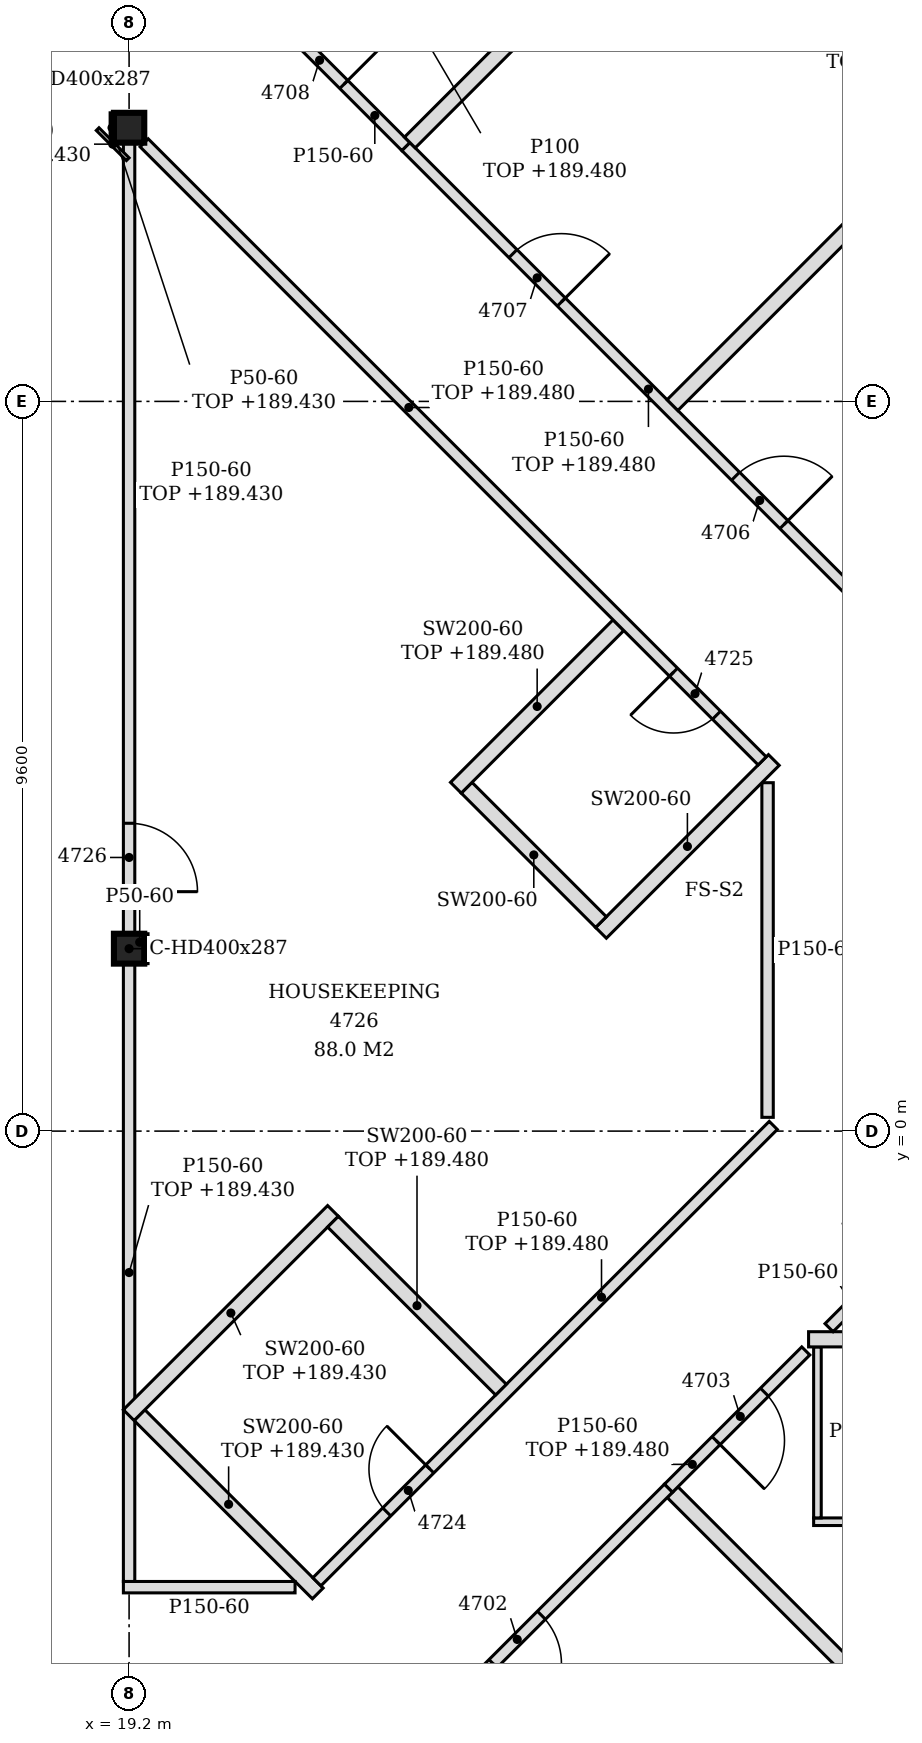
"""IFC4 building model, lengths in metres.
Left out: names, types, materials, properties, quantities, classifications, styles, units other than length and angle.
Written with IfcOpenShell. Run it as: python <this file> out.ifc"""

import sys

from ifc_helpers import new_model, si_unit, direction, frame, frame_2d, origin, origin_2d, place, context, subcontext, project, spatial, polyline, rectangle, i_section, outline, extrude, element, fill, save


model = new_model("IFC4")
c1 = context("Model", 3, precision=1e-05, world=origin(), true_north=direction((0.0, 1.0)))
c2 = subcontext(c1, "Body", "Model", "MODEL_VIEW")
j1 = project(units=[si_unit("LENGTHUNIT", "METRE"), si_unit("PLANEANGLEUNIT", "RADIAN")], contexts=[c1])
p1 = place(None, origin())
s1 = spatial("IfcSite", under=j1, at=p1, CompositionType="ELEMENT")
p2 = place(p1, origin())
s2 = spatial("IfcBuilding", under=s1, at=p2, CompositionType="ELEMENT")
p3 = place(p2, frame((0.0, 0.0, 186.6)))
s3 = spatial("IfcBuildingStorey", under=s2, at=p3, CompositionType="ELEMENT", Elevation=186.6)
for number, where, z_axis, x_axis in (
    (1, (19.2, 2.4, -0.15), (0.0, 0.0, 1.0), (1.0, 0.0, 0.0)),
    (2, (19.2, 13.2, -0.15), (0.0, 0.0, 1.0), (1.0, 0.0, 0.0)),
):
    element("IfcColumn", number, at=place(p3, frame(where, z_axis=z_axis, x_axis=x_axis)), inside=s3, PredefinedType="COLUMN", context=c2, shape_type="SweptSolid", body=[
        extrude(i_section(OverallWidth=0.399, OverallDepth=0.393, WebThickness=0.023, FlangeThickness=0.037, FilletRadius=0.015, at=origin_2d()), origin(), (0.0, 0.0, 1.0), 3.6),
    ])
p4 = place(p3, frame((33.981, -12.381, 0.0), z_axis=(0.0, 0.0, 1.0), x_axis=(-0.707095469378, 0.707118092814, 0.0)))
e3 = element("IfcWall", 3, at=p4, inside=s3, PredefinedType="PARTITIONING", context=c2, shape_type="SweptSolid", body=[
    extrude(rectangle(XDim=10.792, YDim=0.2, at=frame_2d((5.396, 0.0))), origin(), (0.0, 0.0, 1.0), 2.63),
])
p5 = place(p3, frame((20.322, -10.672, 0.0), z_axis=(0.0, 0.0, 1.0), x_axis=(0.707106781187, 0.707106781187, 0.0)))
e4 = element("IfcWall", 4, at=p5, inside=s3, PredefinedType="PARTITIONING", context=c2, shape_type="SweptSolid", body=[
    extrude(rectangle(XDim=8.45, YDim=0.15, at=frame_2d((4.225, 0.0))), origin(), (0.0, 0.0, 1.0), 2.88),
])
p6 = place(p5, frame((0.869, 0.0, 0.0)))
e5 = element("IfcOpeningElement", 5, at=p6, cuts=e4, PredefinedType="OPENING", context=c2, shape_type="SweptSolid", body=[
    extrude(rectangle(XDim=0.9, YDim=2.1, at=frame_2d((0.45, 1.05))), frame((0.0, 0.085, 0.0), z_axis=(0.0, -1.0, 0.0), x_axis=(1.0, 0.0, 0.0)), (0.0, 0.0, 1.0), 0.17),
])
p7 = place(p5, frame((5.185, 0.0, 0.0)))
e6 = element("IfcOpeningElement", 6, at=p7, cuts=e4, PredefinedType="OPENING", context=c2, shape_type="SweptSolid", body=[
    extrude(rectangle(XDim=0.9, YDim=2.1, at=frame_2d((0.45, 1.05))), frame((0.0, 0.085, 0.0), z_axis=(0.0, -1.0, 0.0), x_axis=(1.0, 0.0, 0.0)), (0.0, 0.0, 1.0), 0.17),
])
p8 = place(p3, frame((21.682, -6.082, 0.0), z_axis=(0.0, 0.0, 1.0), x_axis=(-0.707143579957, 0.707069980501, 0.0)))
e7 = element("IfcWall", 7, at=p8, inside=s3, PredefinedType="PARTITIONING", context=c2, shape_type="SweptSolid", body=[
    extrude(rectangle(XDim=3.317, YDim=0.2, at=frame_2d((1.659, 0.0))), origin(), (0.0, 0.0, 1.0), 2.83),
])
p9 = place(p3, frame((19.125, -6.0, 0.0), z_axis=(0.0, 0.0, 1.0), x_axis=(1.0, 0.0, 0.0)))
e8 = element("IfcWall", 8, at=p9, inside=s3, PredefinedType="PARTITIONING", context=c2, shape_type="SweptSolid", body=[
    extrude(outline(polyline([(0.0, 0.0), (2.259, 0.0), (2.259, 3.45), (0.225, 3.45), (0.223, 2.83), (0.0, 2.83), (0.0, 0.0)])), frame((0.0, 0.075, 0.0), z_axis=(0.0, -1.0, 0.0), x_axis=(1.0, 0.0, 0.0)), (0.0, 0.0, 1.0), 0.15),
])
p10 = place(p3, frame((19.2, -5.925, 0.0), z_axis=(0.0, 0.0, 1.0), x_axis=(0.0, 1.0, 0.0)))
e9 = element("IfcWall", 9, at=p10, inside=s3, PredefinedType="PARTITIONING", context=c2, shape_type="SweptSolid", body=[
    extrude(rectangle(XDim=8.129, YDim=0.15, at=frame_2d((4.064, 0.0))), origin(), (0.0, 0.0, 1.0), 2.83),
])
p11 = place(p3, frame((21.671, -5.929, 0.0), z_axis=(0.0, 0.0, 1.0), x_axis=(0.707121156928, 0.707092405153, 0.0)))
e10 = element("IfcWall", 10, at=p11, inside=s3, PredefinedType="PARTITIONING", context=c2, shape_type="SweptSolid", body=[
    extrude(rectangle(XDim=8.491, YDim=0.15, at=frame_2d((4.246, 0.0))), origin(), (0.0, 0.0, 1.0), 2.88),
])
p12 = place(p11, frame((1.3, 0.0, 0.0)))
e11 = element("IfcOpeningElement", 11, at=p12, cuts=e10, PredefinedType="OPENING", context=c2, shape_type="SweptSolid", body=[
    extrude(rectangle(XDim=0.8, YDim=2.1, at=frame_2d((0.4, 1.05))), frame((0.0, 0.085, 0.0), z_axis=(0.0, -1.0, 0.0), x_axis=(1.0, 0.0, 0.0)), (0.0, 0.0, 1.0), 0.17),
])
p13 = place(p3, frame((28.206, -5.139, 0.0), z_axis=(0.0, 0.0, 1.0), x_axis=(1.0, 0.0, 0.0)))
e12 = element("IfcWall", 12, at=p13, inside=s3, PredefinedType="PARTITIONING", context=c2, shape_type="SweptSolid", body=[
    extrude(rectangle(XDim=2.5, YDim=0.1, at=frame_2d((1.25, 0.0))), origin(), (0.0, 0.0, 1.0), 3.45),
])
p14 = place(p3, frame((28.256, -5.089, 0.0), z_axis=(0.0, 0.0, 1.0), x_axis=(0.0, 1.0, 0.0)))
e13 = element("IfcWall", 13, at=p14, inside=s3, PredefinedType="PARTITIONING", context=c2, shape_type="SweptSolid", body=[
    extrude(outline(polyline([(0.0, 0.0), (2.25, 0.0), (2.25, 3.45), (1.744, 3.45), (1.742, 2.88), (1.534, 2.88), (1.532, 3.45), (0.0, 3.45), (0.0, 0.0)])), frame((0.0, 0.05, 0.0), z_axis=(0.0, -1.0, 0.0), x_axis=(1.0, 0.0, 0.0)), (0.0, 0.0, 1.0), 0.1),
])
p15 = place(p3, frame((26.297, -4.697, 0.0), z_axis=(0.0, 0.0, 1.0), x_axis=(0.707250205701, 0.706963327575, 0.0)))
e14 = element("IfcWall", 14, at=p15, inside=s3, PredefinedType="PARTITIONING", context=c2, shape_type="SweptSolid", body=[
    extrude(rectangle(XDim=2.553, YDim=0.15, at=frame_2d((1.276, 0.0))), origin(), (0.0, 0.0, 1.0), 2.88),
])
p16 = place(p15, frame((0.885, 0.0, 0.0)))
e15 = element("IfcOpeningElement", 15, at=p16, cuts=e14, PredefinedType="OPENING", context=c2, shape_type="SweptSolid", body=[
    extrude(rectangle(XDim=0.9, YDim=2.1, at=frame_2d((0.45, 1.05))), frame((0.0, 0.085, 0.0), z_axis=(0.0, -1.0, 0.0), x_axis=(1.0, 0.0, 0.0)), (0.0, 0.0, 1.0), 0.17),
])
p17 = place(p3, frame((19.195, -3.737, 0.0), z_axis=(0.0, 0.0, 1.0), x_axis=(0.707235264291, 0.706978274732, 0.0)))
e16 = element("IfcWall", 16, at=p17, inside=s3, PredefinedType="PARTITIONING", context=c2, shape_type="SweptSolid", body=[
    extrude(rectangle(XDim=3.8, YDim=0.2, at=frame_2d((1.9, 0.0))), origin(), (0.0, 0.0, 1.0), 2.83),
])
p18 = place(p3, frame((24.093, -3.401, 0.0), z_axis=(0.0, 0.0, 1.0), x_axis=(-0.707263013346, 0.7069505145, 0.0)))
e17 = element("IfcWall", 17, at=p18, inside=s3, PredefinedType="PARTITIONING", context=c2, shape_type="SweptSolid", body=[
    extrude(rectangle(XDim=3.125, YDim=0.2, at=frame_2d((1.562, 0.0))), origin(), (0.0, 0.0, 1.0), 2.88),
])
p19 = place(p3, frame((28.139, -2.739, 0.0), z_axis=(0.0, 0.0, 1.0), x_axis=(1.0, 0.0, 0.0)))
e18 = element("IfcWall", 18, at=p19, inside=s3, PredefinedType="PARTITIONING", context=c2, shape_type="SweptSolid", body=[
    extrude(outline(polyline([(0.0, 0.0), (11.081, 0.0), (11.081, 3.45), (3.21, 3.45), (3.208, 2.63), (2.91, 2.63), (2.908, 3.45), (0.0, 3.45), (0.0, 0.0)])), frame((0.0, 0.1, 0.0), z_axis=(0.0, -1.0, 0.0), x_axis=(1.0, 0.0, 0.0)), (0.0, 0.0, 1.0), 0.2),
])
p20 = place(p3, frame((28.409, -2.586, 0.0), z_axis=(0.0, 0.0, 1.0), x_axis=(0.706899570422, 0.707313931248, 0.0)))
e19 = element("IfcWall", 19, at=p20, inside=s3, PredefinedType="PARTITIONING", context=c2, shape_type="SweptSolid", body=[
    extrude(rectangle(XDim=2.357, YDim=0.15, at=frame_2d((1.178, 0.0))), origin(), (0.0, 0.0, 1.0), 3.45),
])
p21 = place(p20, frame((0.867, 0.0, 0.0)))
e20 = element("IfcOpeningElement", 20, at=p21, cuts=e19, PredefinedType="OPENING", context=c2, shape_type="SweptSolid", body=[
    extrude(rectangle(XDim=0.9, YDim=2.1, at=frame_2d((0.45, 1.05))), frame((0.0, 0.085, 0.0), z_axis=(0.0, -1.0, 0.0), x_axis=(1.0, 0.0, 0.0)), (0.0, 0.0, 1.0), 0.17),
])
p22 = place(p3, frame((27.6, 0.181, 0.0), z_axis=(0.0, 0.0, 1.0), x_axis=(0.0, 1.0, 0.0)))
e21 = element("IfcWall", 21, at=p22, inside=s3, PredefinedType="PARTITIONING", context=c2, shape_type="SweptSolid", body=[
    extrude(outline(polyline([(0.0, 0.0), (4.402, 0.0), (4.403, 3.45), (1.274, 3.45), (1.272, 2.88), (1.064, 2.88), (1.062, 3.45), (0.0, 3.45), (0.0, 0.0)])), frame((0.0, 0.075, 0.0), z_axis=(0.0, -1.0, 0.0), x_axis=(1.0, 0.0, 0.0)), (0.0, 0.0, 1.0), 0.15),
])
p23 = place(p3, frame((19.2, 2.596, 0.0), z_axis=(0.0, 0.0, 1.0), x_axis=(0.0, 1.0, 0.0)))
e22 = element("IfcWall", 22, at=p23, inside=s3, PredefinedType="PARTITIONING", context=c2, shape_type="SweptSolid", body=[
    extrude(rectangle(XDim=10.407, YDim=0.15, at=frame_2d((5.204, 0.0))), origin(), (0.0, 0.0, 1.0), 2.83),
])
p24 = place(p23, frame((0.553, 0.0, 0.0)))
e23 = element("IfcOpeningElement", 23, at=p24, cuts=e22, PredefinedType="OPENING", context=c2, shape_type="SweptSolid", body=[
    extrude(rectangle(XDim=0.9, YDim=2.1, at=frame_2d((0.45, 1.05))), frame((0.0, 0.085, 0.0), z_axis=(0.0, -1.0, 0.0), x_axis=(1.0, 0.0, 0.0)), (0.0, 0.0, 1.0), 0.17),
])
p25 = place(p3, frame((25.408, 2.608, 0.0), z_axis=(0.0, 0.0, 1.0), x_axis=(0.707144737481, 0.707068822855, 0.0)))
e24 = element("IfcWall", 24, at=p25, inside=s3, PredefinedType="PARTITIONING", context=c2, shape_type="SweptSolid", body=[
    extrude(rectangle(XDim=3.216, YDim=0.2, at=frame_2d((1.608, 0.0))), origin(), (0.0, 0.0, 1.0), 3.45),
])
p26 = place(p3, frame((25.408, 2.75, 0.0), z_axis=(0.0, 0.0, 1.0), x_axis=(-0.707106781187, 0.707106781187, 0.0)))
e25 = element("IfcWall", 25, at=p26, inside=s3, PredefinedType="PARTITIONING", context=c2, shape_type="SweptSolid", body=[
    extrude(rectangle(XDim=2.5, YDim=0.2, at=frame_2d((1.25, 0.0))), origin(), (0.0, 0.0, 1.0), 3.45),
])
p27 = place(p3, frame((23.499, 4.517, 0.0), z_axis=(0.0, 0.0, 1.0), x_axis=(0.707106781187, 0.707106781187, 0.0)))
e26 = element("IfcWall", 26, at=p27, inside=s3, PredefinedType="PARTITIONING", context=c2, shape_type="SweptSolid", body=[
    extrude(rectangle(XDim=3.025, YDim=0.2, at=frame_2d((1.512, 0.0))), origin(), (0.0, 0.0, 1.0), 2.88),
])
p28 = place(p3, frame((27.529, 4.871, 0.0), z_axis=(0.0, 0.0, 1.0), x_axis=(-0.707106781187, 0.707106781187, 0.0)))
e27 = element("IfcWall", 27, at=p28, inside=s3, PredefinedType="PARTITIONING", context=c2, shape_type="SweptSolid", body=[
    extrude(rectangle(XDim=11.5, YDim=0.15, at=frame_2d((5.75, 0.0))), origin(), (0.0, 0.0, 1.0), 2.88),
])
p29 = place(p28, frame((0.85, 0.0, 0.0)))
e28 = element("IfcOpeningElement", 28, at=p29, cuts=e27, PredefinedType="OPENING", context=c2, shape_type="SweptSolid", body=[
    extrude(rectangle(XDim=0.8, YDim=2.1, at=frame_2d((0.4, 1.05))), frame((0.0, 0.085, 0.0), z_axis=(0.0, -1.0, 0.0), x_axis=(1.0, 0.0, 0.0)), (0.0, 0.0, 1.0), 0.17),
])
p30 = place(p3, frame((29.872, 5.922, 0.0), z_axis=(0.0, 0.0, 1.0), x_axis=(-0.707119057879, 0.707094504281, 0.0)))
e29 = element("IfcWall", 29, at=p30, inside=s3, PredefinedType="PARTITIONING", context=c2, shape_type="SweptSolid", body=[
    extrude(rectangle(XDim=9.943, YDim=0.15, at=frame_2d((4.972, 0.0))), origin(), (0.0, 0.0, 1.0), 2.88),
])
p31 = place(p30, frame((2.909, 0.0, 0.0)))
e30 = element("IfcOpeningElement", 30, at=p31, cuts=e29, PredefinedType="OPENING", context=c2, shape_type="SweptSolid", body=[
    extrude(rectangle(XDim=0.9, YDim=2.1, at=frame_2d((0.45, 1.05))), frame((0.0, 0.085, 0.0), z_axis=(0.0, -1.0, 0.0), x_axis=(1.0, 0.0, 0.0)), (0.0, 0.0, 1.0), 0.17),
])
p32 = place(p30, frame((7.05, 0.0, 0.0)))
e31 = element("IfcOpeningElement", 31, at=p32, cuts=e29, PredefinedType="OPENING", context=c2, shape_type="SweptSolid", body=[
    extrude(rectangle(XDim=0.9, YDim=2.1, at=frame_2d((0.45, 1.05))), frame((0.0, 0.085, 0.0), z_axis=(0.0, -1.0, 0.0), x_axis=(1.0, 0.0, 0.0)), (0.0, 0.0, 1.0), 0.17),
])
p33 = place(p3, frame((26.349, 9.551, 0.0), z_axis=(0.0, 0.0, 1.0), x_axis=(0.707095469378, 0.707118092814, 0.0)))
e32 = element("IfcWall", 32, at=p33, inside=s3, PredefinedType="PARTITIONING", context=c2, shape_type="SweptSolid", body=[
    extrude(rectangle(XDim=10.792, YDim=0.2, at=frame_2d((5.396, 0.0))), origin(), (0.0, 0.0, 1.0), 2.63),
])
p34 = place(p3, frame((22.841, 12.953, 0.0), z_axis=(0.0, 0.0, 1.0), x_axis=(-0.706947809344, 0.707265717297, 0.0)))
e33 = element("IfcWall", 33, at=p34, inside=s3, PredefinedType="PARTITIONING", context=c2, shape_type="SweptSolid", body=[
    extrude(rectangle(XDim=3.072, YDim=0.15, at=frame_2d((1.536, 0.0))), origin(), (0.0, 0.0, 1.0), 3.45),
])
p35 = place(p34, frame((1.155, 0.0, 0.0)))
e34 = element("IfcOpeningElement", 34, at=p35, cuts=e33, PredefinedType="OPENING", context=c2, shape_type="SweptSolid", body=[
    extrude(rectangle(XDim=0.9, YDim=2.1, at=frame_2d((0.45, 1.05))), frame((0.0, 0.085, 0.0), z_axis=(0.0, -1.0, 0.0), x_axis=(1.0, 0.0, 0.0)), (0.0, 0.0, 1.0), 0.17),
])
p36 = place(p3, frame((22.894, 13.006, 0.0), z_axis=(0.0, 0.0, 1.0), x_axis=(0.707106781187, 0.707106781187, 0.0)))
e35 = element("IfcWall", 35, at=p36, inside=s3, PredefinedType="PARTITIONING", context=c2, shape_type="SweptSolid", body=[
    extrude(rectangle(XDim=9.841, YDim=0.2, at=frame_2d((4.92, 0.0))), origin(), (0.0, 0.0, 1.0), 2.88),
])
p37 = place(p3, frame((19.425, 2.204, 0.0), z_axis=(0.0, 0.0, 1.0), x_axis=(0.0, 1.0, 0.0)))
e36 = element("IfcWall", 36, at=p37, inside=s3, PredefinedType="PARTITIONING", context=c2, shape_type="SweptSolid", body=[
    extrude(rectangle(XDim=0.393, YDim=0.05, at=frame_2d((0.196, 0.0))), origin(), (0.0, 0.0, 1.0), 3.45),
])
p38 = place(p3, frame((18.976, 13.003, 0.0), z_axis=(0.0, 0.0, 1.0), x_axis=(0.0, 1.0, 0.0)))
e37 = element("IfcWall", 37, at=p38, inside=s3, PredefinedType="PARTITIONING", context=c2, shape_type="SweptSolid", body=[
    extrude(rectangle(XDim=0.393, YDim=0.05, at=frame_2d((0.197, 0.0))), origin(), (0.0, 0.0, 1.0), 2.83),
])
p39 = place(p3, frame((19.182, 12.786, 0.0), z_axis=(0.0, 0.0, 1.0), x_axis=(-0.707106781187, 0.707106781187, 0.0)))
e38 = element("IfcWall", 38, at=p39, inside=s3, PredefinedType="PARTITIONING", context=c2, shape_type="SweptSolid", body=[
    extrude(rectangle(XDim=0.56, YDim=0.05, at=frame_2d((0.28, 0.0))), origin(), (0.0, 0.0, 1.0), 2.83),
])
p40 = place(p7, frame((0.9, 0.0, 0.0), z_axis=(0.0, 0.0, 1.0), x_axis=(-1.0, 0.0, 0.0)))
e39 = element("IfcDoor", 39, at=p40, inside=s3, OperationType="SINGLE_SWING_RIGHT", PredefinedType="DOOR", context=c2, shape_type="SweptSolid", body=[
    extrude(rectangle(XDim=0.9, YDim=2.1, at=frame_2d((0.45, 1.05))), frame((0.0, 0.025, 0.0), z_axis=(0.0, -1.0, 0.0), x_axis=(1.0, 0.0, 0.0)), (0.0, 0.0, 1.0), 0.05),
])
fill(e6, e39)
p41 = place(p16, frame((0.9, 0.0, 0.0), z_axis=(0.0, 0.0, 1.0), x_axis=(-1.0, 0.0, 0.0)))
e40 = element("IfcDoor", 40, at=p41, inside=s3, OperationType="SINGLE_SWING_RIGHT", PredefinedType="DOOR", context=c2, shape_type="SweptSolid", body=[
    extrude(rectangle(XDim=0.9, YDim=2.1, at=frame_2d((0.45, 1.05))), frame((0.0, 0.025, 0.0), z_axis=(0.0, -1.0, 0.0), x_axis=(1.0, 0.0, 0.0)), (0.0, 0.0, 1.0), 0.05),
])
fill(e15, e40)
p42 = place(p31, frame((0.9, 0.0, 0.0), z_axis=(0.0, 0.0, 1.0), x_axis=(-1.0, 0.0, 0.0)))
e41 = element("IfcDoor", 41, at=p42, inside=s3, OperationType="SINGLE_SWING_RIGHT", PredefinedType="DOOR", context=c2, shape_type="SweptSolid", body=[
    extrude(rectangle(XDim=0.9, YDim=2.1, at=frame_2d((0.45, 1.05))), frame((0.0, 0.025, 0.0), z_axis=(0.0, -1.0, 0.0), x_axis=(1.0, 0.0, 0.0)), (0.0, 0.0, 1.0), 0.05),
])
fill(e30, e41)
p43 = place(p32, frame((0.9, 0.0, 0.0), z_axis=(0.0, 0.0, 1.0), x_axis=(-1.0, 0.0, 0.0)))
e42 = element("IfcDoor", 42, at=p43, inside=s3, OperationType="SINGLE_SWING_RIGHT", PredefinedType="DOOR", context=c2, shape_type="SweptSolid", body=[
    extrude(rectangle(XDim=0.9, YDim=2.1, at=frame_2d((0.45, 1.05))), frame((0.0, 0.025, 0.0), z_axis=(0.0, -1.0, 0.0), x_axis=(1.0, 0.0, 0.0)), (0.0, 0.0, 1.0), 0.05),
])
fill(e31, e42)
p44 = place(p35, frame((0.9, 0.0, 0.0), z_axis=(0.0, 0.0, 1.0), x_axis=(-1.0, 0.0, 0.0)))
e43 = element("IfcDoor", 43, at=p44, inside=s3, OperationType="SINGLE_SWING_RIGHT", PredefinedType="DOOR", context=c2, shape_type="SweptSolid", body=[
    extrude(rectangle(XDim=0.9, YDim=2.1, at=frame_2d((0.45, 1.05))), frame((0.0, 0.025, 0.0), z_axis=(0.0, -1.0, 0.0), x_axis=(1.0, 0.0, 0.0)), (0.0, 0.0, 1.0), 0.05),
])
fill(e34, e43)
p45 = place(p12, origin())
e44 = element("IfcDoor", 44, at=p45, inside=s3, OperationType="SINGLE_SWING_RIGHT", PredefinedType="DOOR", context=c2, shape_type="SweptSolid", body=[
    extrude(rectangle(XDim=0.8, YDim=2.1, at=frame_2d((0.4, 1.05))), frame((0.0, 0.025, 0.0), z_axis=(0.0, -1.0, 0.0), x_axis=(1.0, 0.0, 0.0)), (0.0, 0.0, 1.0), 0.05),
])
fill(e11, e44)
p46 = place(p29, origin())
e45 = element("IfcDoor", 45, at=p46, inside=s3, OperationType="SINGLE_SWING_RIGHT", PredefinedType="DOOR", context=c2, shape_type="SweptSolid", body=[
    extrude(rectangle(XDim=0.8, YDim=2.1, at=frame_2d((0.4, 1.05))), frame((0.0, 0.025, 0.0), z_axis=(0.0, -1.0, 0.0), x_axis=(1.0, 0.0, 0.0)), (0.0, 0.0, 1.0), 0.05),
])
fill(e28, e45)
p47 = place(p24, frame((0.9, 0.0, 0.0), z_axis=(0.0, 0.0, 1.0), x_axis=(-1.0, 0.0, 0.0)))
e46 = element("IfcDoor", 46, at=p47, inside=s3, OperationType="SINGLE_SWING_RIGHT", PredefinedType="DOOR", context=c2, shape_type="SweptSolid", body=[
    extrude(rectangle(XDim=0.9, YDim=2.1, at=frame_2d((0.45, 1.05))), frame((0.0, 0.025, 0.0), z_axis=(0.0, -1.0, 0.0), x_axis=(1.0, 0.0, 0.0)), (0.0, 0.0, 1.0), 0.05),
])
fill(e23, e46)
save(model, sys.argv[1])
